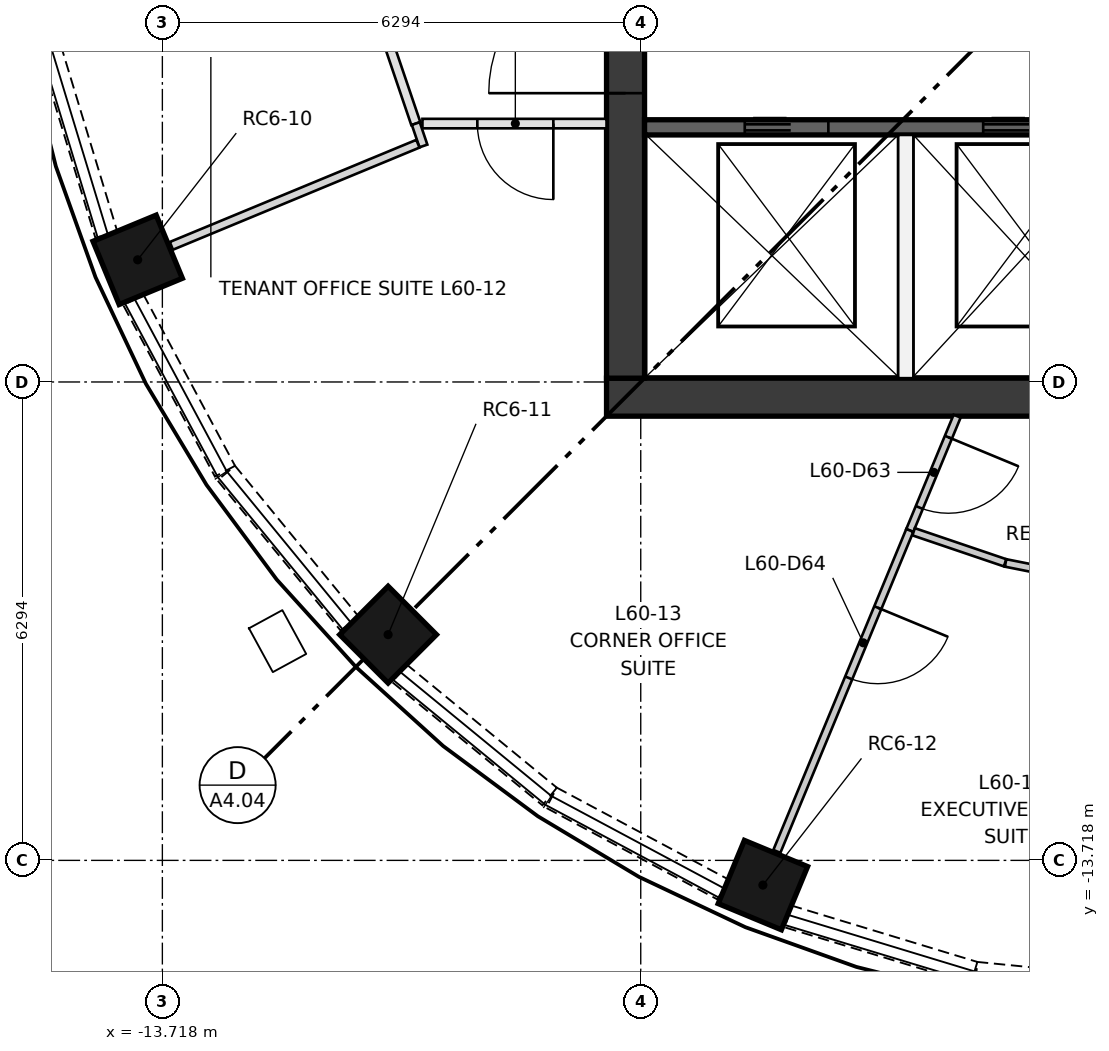
"""IFC4 building model, lengths in metres.
Left out: names, types, materials, properties, quantities, classifications, styles, units other than length and angle.
Written with IfcOpenShell. Run it as: python <this file> out.ifc"""

import sys

from ifc_helpers import new_model, si_unit, direction, frame, frame_2d, origin, origin_2d, place, context, subcontext, project, spatial, rectangle, extrude, element, fill, save


model = new_model("IFC4")
c1 = context("Model", 3, precision=1e-05, world=origin(), true_north=direction((0.0, 1.0)))
c2 = subcontext(c1, "Body", "Model", "MODEL_VIEW")
j1 = project(units=[si_unit("LENGTHUNIT", "METRE"), si_unit("PLANEANGLEUNIT", "RADIAN")], contexts=[c1])
p1 = place(None, origin())
s1 = spatial("IfcSite", under=j1, at=p1, CompositionType="ELEMENT")
p2 = place(p1, origin())
s2 = spatial("IfcBuilding", under=s1, at=p2, CompositionType="ELEMENT")
p3 = place(p2, frame((0.0, 0.0, 221.15)))
s3 = spatial("IfcBuildingStorey", under=s2, at=p3, CompositionType="ELEMENT", Elevation=221.15)
for number, where, z_axis, x_axis in (
    (1, (-14.043, -5.817, 0.0), (0.0, 0.0, 1.0), (-0.924, -0.383, 0.0)),
    (2, (-10.748, -10.748, 0.0), (0.0, 0.0, 1.0), (-0.707, -0.707, 0.0)),
    (3, (-5.817, -14.043, 0.0), (0.0, 0.0, 1.0), (-0.383, -0.924, 0.0)),
):
    element("IfcColumn", number, at=place(p3, frame(where, z_axis=z_axis, x_axis=x_axis)), inside=s3, PredefinedType="COLUMN", context=c2, shape_type="SweptSolid", body=[
        extrude(rectangle(XDim=0.9, YDim=0.9, at=origin_2d()), origin(), (0.0, 0.0, 1.0), 2.85),
    ])
p4 = place(p3, frame((-7.874, -7.624, 0.0), z_axis=(0.0, 0.0, 1.0), x_axis=(1.0, 0.0, 0.0)))
e4 = element("IfcWall", 4, at=p4, inside=s3, PredefinedType="SHEAR", context=c2, shape_type="SweptSolid", body=[
    extrude(rectangle(XDim=15.748, YDim=0.5, at=frame_2d((7.874, 0.0))), origin(), (0.0, 0.0, 1.0), 3.35),
])
p5 = place(p3, frame((-7.624, -7.374, 0.0), z_axis=(0.0, 0.0, 1.0), x_axis=(0.0, 1.0, 0.0)))
e5 = element("IfcWall", 5, at=p5, inside=s3, PredefinedType="SHEAR", context=c2, shape_type="SweptSolid", body=[
    extrude(rectangle(XDim=14.748, YDim=0.5, at=frame_2d((7.374, 0.0))), origin(), (0.0, 0.0, 1.0), 3.35),
])
p6 = place(p5, frame((6.874, 0.0, 0.0)))
e6 = element("IfcOpeningElement", 6, at=p6, cuts=e5, PredefinedType="OPENING", context=c2, shape_type="SweptSolid", body=[
    extrude(rectangle(XDim=1.0, YDim=2.1, at=frame_2d((0.5, 1.05))), frame((0.0, 0.26, 0.0), z_axis=(0.0, -1.0, 0.0), x_axis=(1.0, 0.0, 0.0)), (0.0, 0.0, 1.0), 0.52),
])
p7 = place(p5, frame((3.75, 0.0, 0.0)))
e7 = element("IfcOpeningElement", 7, at=p7, cuts=e5, PredefinedType="OPENING", context=c2, shape_type="SweptSolid", body=[
    extrude(rectangle(XDim=1.8, YDim=2.1, at=frame_2d((0.9, 1.05))), frame((0.0, 0.26, 0.0), z_axis=(0.0, -1.0, 0.0), x_axis=(1.0, 0.0, 0.0)), (0.0, 0.0, 1.0), 0.52),
])
p8 = place(p5, frame((9.198, 0.0, 0.0)))
e8 = element("IfcOpeningElement", 8, at=p8, cuts=e5, PredefinedType="OPENING", context=c2, shape_type="SweptSolid", body=[
    extrude(rectangle(XDim=1.8, YDim=2.1, at=frame_2d((0.9, 1.05))), frame((0.0, 0.26, 0.0), z_axis=(0.0, -1.0, 0.0), x_axis=(1.0, 0.0, 0.0)), (0.0, 0.0, 1.0), 0.52),
])
p9 = place(p3, frame((-7.374, -4.074, 0.0), z_axis=(0.0, 0.0, 1.0), x_axis=(1.0, 0.0, 0.0)))
e9 = element("IfcWall", 9, at=p9, inside=s3, PredefinedType="SHEAR", context=c2, shape_type="SweptSolid", body=[
    extrude(rectangle(XDim=14.748, YDim=0.2, at=frame_2d((7.374, 0.0))), origin(), (0.0, 0.0, 1.0), 3.0),
])
p10 = place(p9, frame((1.319, 0.0, 0.0)))
e10 = element("IfcOpeningElement", 10, at=p10, cuts=e9, PredefinedType="OPENING", context=c2, shape_type="SweptSolid", body=[
    extrude(rectangle(XDim=1.1, YDim=2.1, at=frame_2d((0.55, 1.05))), frame((0.0, 0.11, 0.0), z_axis=(0.0, -1.0, 0.0), x_axis=(1.0, 0.0, 0.0)), (0.0, 0.0, 1.0), 0.22),
])
p11 = place(p9, frame((4.456, 0.0, 0.0)))
e11 = element("IfcOpeningElement", 11, at=p11, cuts=e9, PredefinedType="OPENING", context=c2, shape_type="SweptSolid", body=[
    extrude(rectangle(XDim=1.1, YDim=2.1, at=frame_2d((0.55, 1.05))), frame((0.0, 0.11, 0.0), z_axis=(0.0, -1.0, 0.0), x_axis=(1.0, 0.0, 0.0)), (0.0, 0.0, 1.0), 0.22),
])
p12 = place(p9, frame((8.143, 0.0, 0.0)))
e12 = element("IfcOpeningElement", 12, at=p12, cuts=e9, PredefinedType="OPENING", context=c2, shape_type="SweptSolid", body=[
    extrude(rectangle(XDim=1.0, YDim=2.1, at=frame_2d((0.5, 1.05))), frame((0.0, 0.11, 0.0), z_axis=(0.0, -1.0, 0.0), x_axis=(1.0, 0.0, 0.0)), (0.0, 0.0, 1.0), 0.22),
])
p13 = place(p9, frame((12.379, 0.0, 0.0)))
e13 = element("IfcOpeningElement", 13, at=p13, cuts=e9, PredefinedType="OPENING", context=c2, shape_type="SweptSolid", body=[
    extrude(rectangle(XDim=0.8, YDim=2.1, at=frame_2d((0.4, 1.05))), frame((0.0, 0.11, 0.0), z_axis=(0.0, -1.0, 0.0), x_axis=(1.0, 0.0, 0.0)), (0.0, 0.0, 1.0), 0.22),
])
p14 = place(p3, frame((-3.937, -7.374, 0.0), z_axis=(0.0, 0.0, 1.0), x_axis=(0.0, 1.0, 0.0)))
e14 = element("IfcWall", 14, at=p14, inside=s3, PredefinedType="PARTITIONING", context=c2, shape_type="SweptSolid", body=[
    extrude(rectangle(XDim=3.2, YDim=0.2, at=frame_2d((1.6, 0.0))), origin(), (0.0, 0.0, 1.0), 3.0),
])
p15 = place(p3, frame((-15.198, -3.038, 0.0), z_axis=(0.0, 0.0, 1.0), x_axis=(0.290219358397, -0.956960147557, 0.0)))
e15 = element("IfcWall", 15, at=p15, inside=s3, PredefinedType="SOLIDWALL", context=c2, shape_type="SweptSolid", body=[
    extrude(rectangle(XDim=2.557, YDim=0.3, at=frame_2d((1.279, 0.0))), origin(), (0.0, 0.0, 1.0), 0.9),
])
p16 = place(p3, frame((-14.1, -6.343, 0.0), z_axis=(0.0, 0.0, 1.0), x_axis=(0.471603904468, -0.881810499649, 0.0)))
e16 = element("IfcWall", 16, at=p16, inside=s3, PredefinedType="SOLIDWALL", context=c2, shape_type="SweptSolid", body=[
    extrude(rectangle(XDim=2.557, YDim=0.3, at=frame_2d((1.278, 0.0))), origin(), (0.0, 0.0, 1.0), 0.9),
])
for number, where, z_axis, x_axis in (
    (17, (-12.877, -8.623, 0.0), (0.0, 0.0, 1.0), (0.634, -0.773, 0.0)),
    (18, (-10.6, -11.256, 0.0), (0.0, 0.0, 1.0), (0.773, -0.634, 0.0)),
):
    element("IfcWall", number, at=place(p3, frame(where, z_axis=z_axis, x_axis=x_axis)), inside=s3, PredefinedType="SOLIDWALL", context=c2, shape_type="SweptSolid", body=[
        extrude(rectangle(XDim=2.558, YDim=0.3, at=frame_2d((1.279, 0.0))), origin(), (0.0, 0.0, 1.0), 0.9),
    ])
p17 = place(p3, frame((-8.598, -12.894, 0.0), z_axis=(0.0, 0.0, 1.0), x_axis=(0.881810499649, -0.471603904468, 0.0)))
e19 = element("IfcWall", 19, at=p17, inside=s3, PredefinedType="SOLIDWALL", context=c2, shape_type="SweptSolid", body=[
    extrude(rectangle(XDim=2.557, YDim=0.3, at=frame_2d((1.278, 0.0))), origin(), (0.0, 0.0, 1.0), 0.9),
])
p18 = place(p3, frame((-5.486, -14.455, 0.0), z_axis=(0.0, 0.0, 1.0), x_axis=(0.956960147557, -0.290219358397, 0.0)))
e20 = element("IfcWall", 20, at=p18, inside=s3, PredefinedType="SOLIDWALL", context=c2, shape_type="SweptSolid", body=[
    extrude(rectangle(XDim=2.557, YDim=0.3, at=frame_2d((1.279, 0.0))), origin(), (0.0, 0.0, 1.0), 0.9),
])
p19 = place(p3, frame((-3.009, -15.204, 0.0), z_axis=(0.0, 0.0, 1.0), x_axis=(0.995173293352, -0.09813315545, 0.0)))
e21 = element("IfcWall", 21, at=p19, inside=s3, PredefinedType="SOLIDWALL", context=c2, shape_type="SweptSolid", body=[
    extrude(rectangle(XDim=2.558, YDim=0.3, at=frame_2d((1.279, 0.0))), origin(), (0.0, 0.0, 1.0), 0.9),
])
p20 = place(p3, frame((-10.384, -4.024, 0.0), z_axis=(0.0, 0.0, 1.0), x_axis=(-0.321479033524, 0.946916696972, 0.0)))
e22 = element("IfcWall", 22, at=p20, inside=s3, PredefinedType="PARTITIONING", context=c2, shape_type="SweptSolid", body=[
    extrude(rectangle(XDim=1.198, YDim=0.125, at=frame_2d((0.599, 0.0))), origin(), (0.0, 0.0, 1.0), 3.0),
])
p21 = place(p3, frame((-7.874, -4.024, 0.0), z_axis=(0.0, 0.0, 1.0), x_axis=(-1.0, 0.0, 0.0)))
e23 = element("IfcWall", 23, at=p21, inside=s3, PredefinedType="PARTITIONING", context=c2, shape_type="SweptSolid", body=[
    extrude(rectangle(XDim=2.422, YDim=0.125, at=frame_2d((1.211, 0.0))), origin(), (0.0, 0.0, 1.0), 3.0),
])
p22 = place(p21, frame((0.7, 0.0, 0.0)))
e24 = element("IfcOpeningElement", 24, at=p22, cuts=e23, PredefinedType="OPENING", context=c2, shape_type="SweptSolid", body=[
    extrude(rectangle(XDim=1.0, YDim=2.1, at=frame_2d((0.5, 1.05))), frame((0.0, 0.073, 0.0), z_axis=(0.0, -1.0, 0.0), x_axis=(1.0, 0.0, 0.0)), (0.0, 0.0, 1.0), 0.145),
])
p23 = place(p3, frame((-10.384, -4.024, 0.0), z_axis=(0.0, 0.0, 1.0), x_axis=(0.320931919594, -0.947102266382, 0.0)))
e25 = element("IfcWall", 25, at=p23, inside=s3, PredefinedType="PARTITIONING", context=c2, shape_type="SweptSolid", body=[
    extrude(rectangle(XDim=0.311, YDim=0.11, at=frame_2d((0.156, 0.0))), origin(), (0.0, 0.0, 1.0), 3.0),
])
p24 = place(p3, frame((-10.356, -4.289, 0.0), z_axis=(0.0, 0.0, 1.0), x_axis=(-0.923871065891, -0.382703871955, 0.0)))
e26 = element("IfcWall", 26, at=p24, inside=s3, PredefinedType="PARTITIONING", context=c2, shape_type="SweptSolid", body=[
    extrude(rectangle(XDim=3.511, YDim=0.11, at=frame_2d((1.756, 0.0))), origin(), (0.0, 0.0, 1.0), 3.0),
])
p25 = place(p3, frame((-3.261, -7.874, 0.0), z_axis=(0.0, 0.0, 1.0), x_axis=(-0.382718376354, -0.923865057463, 0.0)))
e27 = element("IfcWall", 27, at=p25, inside=s3, PredefinedType="PARTITIONING", context=c2, shape_type="SweptSolid", body=[
    extrude(rectangle(XDim=1.627, YDim=0.1, at=frame_2d((0.813, 0.0))), origin(), (0.0, 0.0, 1.0), 3.0),
])
p26 = place(p25, frame((0.3, 0.0, 0.0)))
e28 = element("IfcOpeningElement", 28, at=p26, cuts=e27, PredefinedType="OPENING", context=c2, shape_type="SweptSolid", body=[
    extrude(rectangle(XDim=1.0, YDim=2.1, at=frame_2d((0.5, 1.05))), frame((0.0, 0.06, 0.0), z_axis=(0.0, -1.0, 0.0), x_axis=(1.0, 0.0, 0.0)), (0.0, 0.0, 1.0), 0.12),
])
p27 = place(p3, frame((-3.884, -9.377, 0.0), z_axis=(0.0, 0.0, 1.0), x_axis=(-0.382664766489, -0.923887263949, 0.0)))
e29 = element("IfcWall", 29, at=p27, inside=s3, PredefinedType="PARTITIONING", context=c2, shape_type="SweptSolid", body=[
    extrude(rectangle(XDim=4.57, YDim=0.1, at=frame_2d((2.285, 0.0))), origin(), (0.0, 0.0, 1.0), 3.0),
])
p28 = place(p27, frame((1.1, 0.0, 0.0)))
e30 = element("IfcOpeningElement", 30, at=p28, cuts=e29, PredefinedType="OPENING", context=c2, shape_type="SweptSolid", body=[
    extrude(rectangle(XDim=1.0, YDim=2.1, at=frame_2d((0.5, 1.05))), frame((0.0, 0.06, 0.0), z_axis=(0.0, -1.0, 0.0), x_axis=(1.0, 0.0, 0.0)), (0.0, 0.0, 1.0), 0.12),
])
p29 = place(p3, frame((-2.63, -9.803, 0.0), z_axis=(0.0, 0.0, 1.0), x_axis=(-0.946940072487, 0.321410172706, 0.0)))
e31 = element("IfcWall", 31, at=p29, inside=s3, PredefinedType="PARTITIONING", context=c2, shape_type="SweptSolid", body=[
    extrude(rectangle(XDim=1.271, YDim=0.1, at=frame_2d((0.635, 0.0))), origin(), (0.0, 0.0, 1.0), 3.0),
])
p30 = place(p3, frame((-1.328, -10.062, 0.0), z_axis=(0.0, 0.0, 1.0), x_axis=(-0.980779158075, 0.195121098517, 0.0)))
e32 = element("IfcWall", 32, at=p30, inside=s3, PredefinedType="PARTITIONING", context=c2, shape_type="SweptSolid", body=[
    extrude(rectangle(XDim=1.321, YDim=0.1, at=frame_2d((0.661, 0.0))), origin(), (0.0, 0.0, 1.0), 3.0),
])
p31 = place(p10, origin())
e33 = element("IfcDoor", 33, at=p31, inside=s3, OperationType="DOUBLE_DOOR_SLIDING", PredefinedType="DOOR", context=c2, shape_type="SweptSolid", body=[
    extrude(rectangle(XDim=1.1, YDim=2.1, at=frame_2d((0.55, 1.05))), frame((0.0, 0.025, 0.0), z_axis=(0.0, -1.0, 0.0), x_axis=(1.0, 0.0, 0.0)), (0.0, 0.0, 1.0), 0.05),
])
fill(e10, e33)
p32 = place(p11, origin())
e34 = element("IfcDoor", 34, at=p32, inside=s3, OperationType="DOUBLE_DOOR_SLIDING", PredefinedType="DOOR", context=c2, shape_type="SweptSolid", body=[
    extrude(rectangle(XDim=1.1, YDim=2.1, at=frame_2d((0.55, 1.05))), frame((0.0, 0.025, 0.0), z_axis=(0.0, -1.0, 0.0), x_axis=(1.0, 0.0, 0.0)), (0.0, 0.0, 1.0), 0.05),
])
fill(e11, e34)
p33 = place(p7, origin())
e35 = element("IfcDoor", 35, at=p33, inside=s3, OperationType="DOUBLE_DOOR_SINGLE_SWING", PredefinedType="DOOR", context=c2, shape_type="SweptSolid", body=[
    extrude(rectangle(XDim=1.8, YDim=2.1, at=frame_2d((0.9, 1.05))), frame((0.0, 0.025, 0.0), z_axis=(0.0, -1.0, 0.0), x_axis=(1.0, 0.0, 0.0)), (0.0, 0.0, 1.0), 0.05),
])
fill(e7, e35)
p34 = place(p22, origin())
e36 = element("IfcDoor", 36, at=p34, inside=s3, OperationType="SINGLE_SWING_LEFT", PredefinedType="DOOR", context=c2, shape_type="SweptSolid", body=[
    extrude(rectangle(XDim=1.0, YDim=2.1, at=frame_2d((0.5, 1.05))), frame((0.0, 0.025, 0.0), z_axis=(0.0, -1.0, 0.0), x_axis=(1.0, 0.0, 0.0)), (0.0, 0.0, 1.0), 0.05),
])
fill(e24, e36)
p35 = place(p26, origin())
e37 = element("IfcDoor", 37, at=p35, inside=s3, OperationType="SINGLE_SWING_LEFT", PredefinedType="DOOR", context=c2, shape_type="SweptSolid", body=[
    extrude(rectangle(XDim=1.0, YDim=2.1, at=frame_2d((0.5, 1.05))), frame((0.0, 0.025, 0.0), z_axis=(0.0, -1.0, 0.0), x_axis=(1.0, 0.0, 0.0)), (0.0, 0.0, 1.0), 0.05),
])
fill(e28, e37)
p36 = place(p28, origin())
e38 = element("IfcDoor", 38, at=p36, inside=s3, OperationType="SINGLE_SWING_LEFT", PredefinedType="DOOR", context=c2, shape_type="SweptSolid", body=[
    extrude(rectangle(XDim=1.0, YDim=2.1, at=frame_2d((0.5, 1.05))), frame((0.0, 0.025, 0.0), z_axis=(0.0, -1.0, 0.0), x_axis=(1.0, 0.0, 0.0)), (0.0, 0.0, 1.0), 0.05),
])
fill(e30, e38)
save(model, sys.argv[1])
